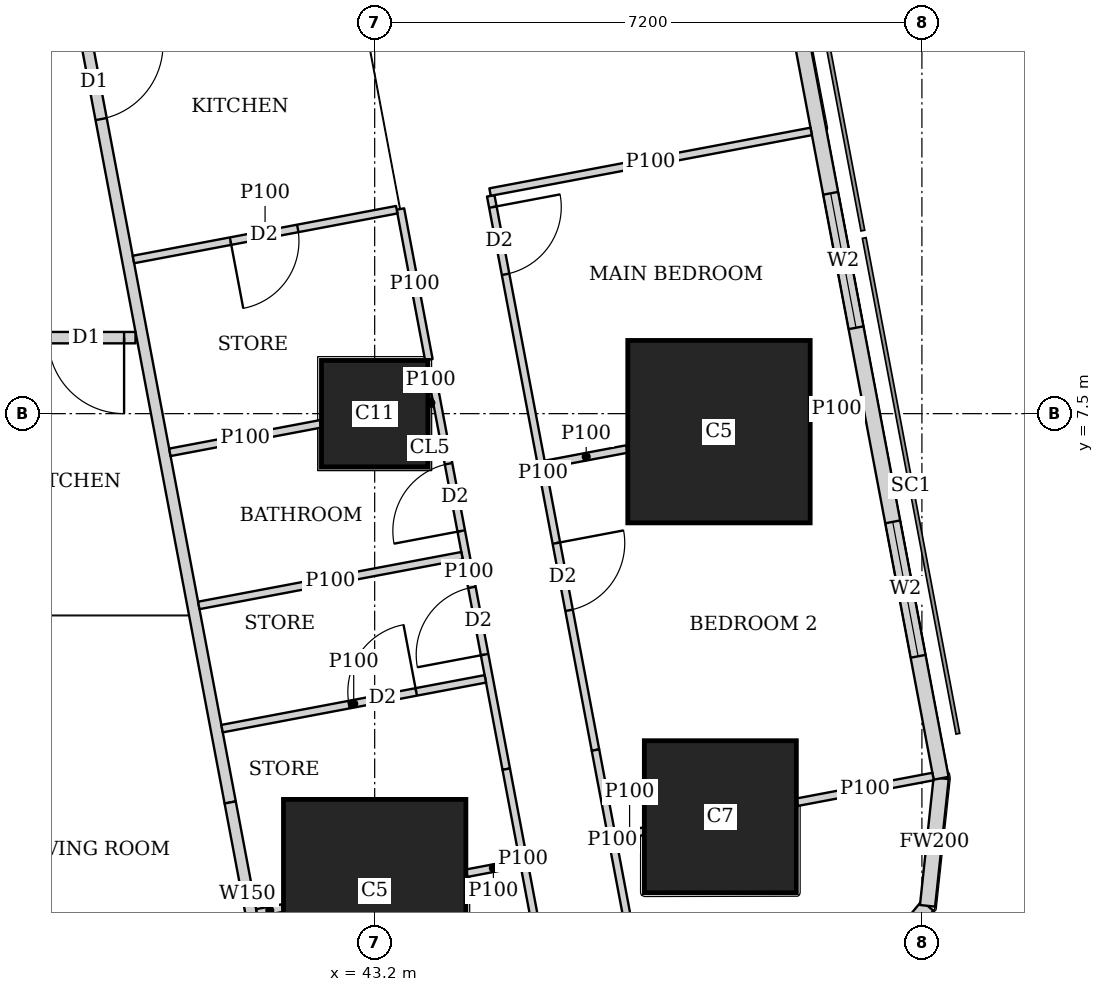
"""IFC4 building model, lengths in metres.
Left out: names, types, materials, properties, quantities, classifications, styles, units other than length and angle.
Written with IfcOpenShell. Run it as: python <this file> out.ifc"""

import sys

from ifc_helpers import new_model, si_unit, direction, frame, frame_2d, origin, origin_2d, place, context, subcontext, project, spatial, rectangle, extrude, element, fill, save


model = new_model("IFC4")
c1 = context("Model", 3, precision=1e-05, world=origin(), true_north=direction((0.0, 1.0)))
c2 = subcontext(c1, "Body", "Model", "MODEL_VIEW")
j1 = project(units=[si_unit("LENGTHUNIT", "METRE"), si_unit("PLANEANGLEUNIT", "RADIAN")], contexts=[c1])
p1 = place(None, origin())
s1 = spatial("IfcSite", under=j1, at=p1, CompositionType="ELEMENT")
p2 = place(p1, origin())
s2 = spatial("IfcBuilding", under=s1, at=p2, CompositionType="ELEMENT")
p3 = place(p2, frame((0.0, 0.0, 227.45)))
s3 = spatial("IfcBuildingStorey", under=s2, at=p3, CompositionType="ELEMENT", Elevation=227.45)
p4 = place(p3, frame((43.2, 1.225, 0.0), z_axis=(0.0, 0.0, 1.0), x_axis=(1.0, 0.0, 0.0)))
e1 = element("IfcColumn", 1, at=p4, inside=s3, PredefinedType="COLUMN", context=c2, shape_type="SweptSolid", body=[
    extrude(rectangle(XDim=2.4, YDim=2.4, at=origin_2d()), origin(), (0.0, 0.0, 1.0), 3.75),
])
p5 = place(p3, frame((47.748, 2.197, 0.0), z_axis=(0.0, 0.0, 1.0), x_axis=(1.0, 0.0, 0.0)))
e2 = element("IfcColumn", 2, at=p5, inside=s3, PredefinedType="COLUMN", context=c2, shape_type="SweptSolid", body=[
    extrude(rectangle(XDim=2.0, YDim=2.0, at=origin_2d()), origin(), (0.0, 0.0, 1.0), 3.75),
])
p6 = place(p3, frame((43.2, 7.5, 0.0), z_axis=(0.0, 0.0, 1.0), x_axis=(1.0, 0.0, 0.0)))
e3 = element("IfcColumn", 3, at=p6, inside=s3, PredefinedType="COLUMN", context=c2, shape_type="SweptSolid", body=[
    extrude(rectangle(XDim=1.4, YDim=1.4, at=origin_2d()), origin(), (0.0, 0.0, 1.0), 3.75),
])
p7 = place(p3, frame((47.73, 7.263, 0.0), z_axis=(0.0, 0.0, 1.0), x_axis=(1.0, 0.0, 0.0)))
e4 = element("IfcColumn", 4, at=p7, inside=s3, PredefinedType="COLUMN", context=c2, shape_type="SweptSolid", body=[
    extrude(rectangle(XDim=2.4, YDim=2.4, at=origin_2d()), origin(), (0.0, 0.0, 1.0), 3.75),
])
p8 = place(p3, frame((49.407, -0.263, 0.0), z_axis=(0.0, 0.0, 1.0), x_axis=(0.638042593423, 0.770001070764, 0.0)))
e5 = element("IfcWall", 5, at=p8, inside=s3, PredefinedType="SOLIDWALL", context=c2, shape_type="SweptSolid", body=[
    extrude(rectangle(XDim=1.673, YDim=0.2, at=frame_2d((0.836, 0.0))), origin(), (0.0, 0.0, 1.0), 3.5),
])
p9 = place(p3, frame((50.474, 1.025, 0.0), z_axis=(0.0, 0.0, 1.0), x_axis=(0.106047815515, 0.994361031429, 0.0)))
e6 = element("IfcWall", 6, at=p9, inside=s3, PredefinedType="SOLIDWALL", context=c2, shape_type="SweptSolid", body=[
    extrude(rectangle(XDim=1.688, YDim=0.2, at=frame_2d((0.844, 0.0))), origin(), (0.0, 0.0, 1.0), 3.5),
])
p10 = place(p3, frame((50.653, 2.703, 0.0), z_axis=(0.0, 0.0, 1.0), x_axis=(-0.185612026696, 0.982623109613, 0.0)))
e7 = element("IfcWall", 7, at=p10, inside=s3, PredefinedType="SOLIDWALL", context=c2, shape_type="SweptSolid", body=[
    extrude(rectangle(XDim=41.393, YDim=0.2, at=frame_2d((20.697, 0.0))), origin(), (0.0, 0.0, 1.0), 3.5),
])
p11 = place(p10, frame((1.633, 0.0, 0.9)))
e8 = element("IfcOpeningElement", 8, at=p11, cuts=e7, PredefinedType="OPENING", context=c2, shape_type="SweptSolid", body=[
    extrude(rectangle(XDim=1.8, YDim=1.5, at=frame_2d((0.9, 0.75))), frame((0.0, 0.11, 0.0), z_axis=(0.0, -1.0, 0.0), x_axis=(1.0, 0.0, 0.0)), (0.0, 0.0, 1.0), 0.22),
])
p12 = place(p10, frame((6.032, 0.0, 0.9)))
e9 = element("IfcOpeningElement", 9, at=p12, cuts=e7, PredefinedType="OPENING", context=c2, shape_type="SweptSolid", body=[
    extrude(rectangle(XDim=1.8, YDim=1.5, at=frame_2d((0.9, 0.75))), frame((0.0, 0.11, 0.0), z_axis=(0.0, -1.0, 0.0), x_axis=(1.0, 0.0, 0.0)), (0.0, 0.0, 1.0), 0.22),
])
p13 = place(p10, frame((9.848, 0.0, 0.9)))
e10 = element("IfcOpeningElement", 10, at=p13, cuts=e7, PredefinedType="OPENING", context=c2, shape_type="SweptSolid", body=[
    extrude(rectangle(XDim=1.8, YDim=1.5, at=frame_2d((0.9, 0.75))), frame((0.0, 0.11, 0.0), z_axis=(0.0, -1.0, 0.0), x_axis=(1.0, 0.0, 0.0)), (0.0, 0.0, 1.0), 0.22),
])
p14 = place(p10, frame((13.664, 0.0, 0.9)))
e11 = element("IfcOpeningElement", 11, at=p14, cuts=e7, PredefinedType="OPENING", context=c2, shape_type="SweptSolid", body=[
    extrude(rectangle(XDim=1.8, YDim=1.5, at=frame_2d((0.9, 0.75))), frame((0.0, 0.11, 0.0), z_axis=(0.0, -1.0, 0.0), x_axis=(1.0, 0.0, 0.0)), (0.0, 0.0, 1.0), 0.22),
])
p15 = place(p10, frame((17.481, 0.0, 0.9)))
e12 = element("IfcOpeningElement", 12, at=p15, cuts=e7, PredefinedType="OPENING", context=c2, shape_type="SweptSolid", body=[
    extrude(rectangle(XDim=1.8, YDim=1.5, at=frame_2d((0.9, 0.75))), frame((0.0, 0.11, 0.0), z_axis=(0.0, -1.0, 0.0), x_axis=(1.0, 0.0, 0.0)), (0.0, 0.0, 1.0), 0.22),
])
p16 = place(p10, frame((21.297, 0.0, 0.9)))
e13 = element("IfcOpeningElement", 13, at=p16, cuts=e7, PredefinedType="OPENING", context=c2, shape_type="SweptSolid", body=[
    extrude(rectangle(XDim=1.8, YDim=1.5, at=frame_2d((0.9, 0.75))), frame((0.0, 0.11, 0.0), z_axis=(0.0, -1.0, 0.0), x_axis=(1.0, 0.0, 0.0)), (0.0, 0.0, 1.0), 0.22),
])
p17 = place(p10, frame((25.113, 0.0, 0.9)))
e14 = element("IfcOpeningElement", 14, at=p17, cuts=e7, PredefinedType="OPENING", context=c2, shape_type="SweptSolid", body=[
    extrude(rectangle(XDim=1.8, YDim=1.5, at=frame_2d((0.9, 0.75))), frame((0.0, 0.11, 0.0), z_axis=(0.0, -1.0, 0.0), x_axis=(1.0, 0.0, 0.0)), (0.0, 0.0, 1.0), 0.22),
])
p18 = place(p10, frame((28.93, 0.0, 0.9)))
e15 = element("IfcOpeningElement", 15, at=p18, cuts=e7, PredefinedType="OPENING", context=c2, shape_type="SweptSolid", body=[
    extrude(rectangle(XDim=1.8, YDim=1.5, at=frame_2d((0.9, 0.75))), frame((0.0, 0.11, 0.0), z_axis=(0.0, -1.0, 0.0), x_axis=(1.0, 0.0, 0.0)), (0.0, 0.0, 1.0), 0.22),
])
p19 = place(p10, frame((32.746, 0.0, 0.9)))
e16 = element("IfcOpeningElement", 16, at=p19, cuts=e7, PredefinedType="OPENING", context=c2, shape_type="SweptSolid", body=[
    extrude(rectangle(XDim=1.8, YDim=1.5, at=frame_2d((0.9, 0.75))), frame((0.0, 0.11, 0.0), z_axis=(0.0, -1.0, 0.0), x_axis=(1.0, 0.0, 0.0)), (0.0, 0.0, 1.0), 0.22),
])
p20 = place(p10, frame((36.481, 0.0, 0.9)))
e17 = element("IfcOpeningElement", 17, at=p20, cuts=e7, PredefinedType="OPENING", context=c2, shape_type="SweptSolid", body=[
    extrude(rectangle(XDim=1.8, YDim=1.5, at=frame_2d((0.9, 0.75))), frame((0.0, 0.11, 0.0), z_axis=(0.0, -1.0, 0.0), x_axis=(1.0, 0.0, 0.0)), (0.0, 0.0, 1.0), 0.22),
])
p21 = place(p3, frame((40.053, 8.5, 0.0), z_axis=(0.0, 0.0, 1.0), x_axis=(-1.0, 0.0, 0.0)))
e18 = element("IfcWall", 18, at=p21, inside=s3, PredefinedType="SOLIDWALL", context=c2, shape_type="SweptSolid", body=[
    extrude(rectangle(XDim=23.798, YDim=0.15, at=frame_2d((11.899, 0.0))), origin(), (0.0, 0.0, 1.0), 3.5),
])
p22 = place(p21, frame((21.978, 0.0, 0.0)))
e19 = element("IfcOpeningElement", 19, at=p22, cuts=e18, PredefinedType="OPENING", context=c2, shape_type="SweptSolid", body=[
    extrude(rectangle(XDim=1.0, YDim=2.1, at=frame_2d((0.5, 1.05))), frame((0.0, 0.085, 0.0), z_axis=(0.0, -1.0, 0.0), x_axis=(1.0, 0.0, 0.0)), (0.0, 0.0, 1.0), 0.17),
])
p23 = place(p21, frame((12.753, 0.0, 0.0)))
e20 = element("IfcOpeningElement", 20, at=p23, cuts=e18, PredefinedType="OPENING", context=c2, shape_type="SweptSolid", body=[
    extrude(rectangle(XDim=1.0, YDim=2.1, at=frame_2d((0.5, 1.05))), frame((0.0, 0.085, 0.0), z_axis=(0.0, -1.0, 0.0), x_axis=(1.0, 0.0, 0.0)), (0.0, 0.0, 1.0), 0.17),
])
p24 = place(p21, frame((0.15, 0.0, 0.0)))
e21 = element("IfcOpeningElement", 21, at=p24, cuts=e18, PredefinedType="OPENING", context=c2, shape_type="SweptSolid", body=[
    extrude(rectangle(XDim=1.0, YDim=2.1, at=frame_2d((0.5, 1.05))), frame((0.0, 0.085, 0.0), z_axis=(0.0, -1.0, 0.0), x_axis=(1.0, 0.0, 0.0)), (0.0, 0.0, 1.0), 0.17),
])
p25 = place(p3, frame((33.68, 42.723, 0.0), z_axis=(0.0, 0.0, 1.0), x_axis=(0.185601160014, -0.982625162207, 0.0)))
e22 = element("IfcWall", 22, at=p25, inside=s3, PredefinedType="SOLIDWALL", context=c2, shape_type="SweptSolid", body=[
    extrude(rectangle(XDim=41.051, YDim=0.15, at=frame_2d((20.526, 0.0))), origin(), (0.0, 0.0, 1.0), 2.5),
])
p26 = place(p25, frame((16.123, 0.0, 0.0)))
e23 = element("IfcOpeningElement", 23, at=p26, cuts=e22, PredefinedType="OPENING", context=c2, shape_type="SweptSolid", body=[
    extrude(rectangle(XDim=1.0, YDim=2.1, at=frame_2d((0.5, 1.05))), frame((0.0, 0.085, 0.0), z_axis=(0.0, -1.0, 0.0), x_axis=(1.0, 0.0, 0.0)), (0.0, 0.0, 1.0), 0.17),
])
p27 = place(p25, frame((19.938, 0.0, 0.0)))
e24 = element("IfcOpeningElement", 24, at=p27, cuts=e22, PredefinedType="OPENING", context=c2, shape_type="SweptSolid", body=[
    extrude(rectangle(XDim=1.0, YDim=2.1, at=frame_2d((0.5, 1.05))), frame((0.0, 0.085, 0.0), z_axis=(0.0, -1.0, 0.0), x_axis=(1.0, 0.0, 0.0)), (0.0, 0.0, 1.0), 0.17),
])
p28 = place(p25, frame((30.902, 0.0, 0.0)))
e25 = element("IfcOpeningElement", 25, at=p28, cuts=e22, PredefinedType="OPENING", context=c2, shape_type="SweptSolid", body=[
    extrude(rectangle(XDim=1.0, YDim=2.1, at=frame_2d((0.5, 1.05))), frame((0.0, 0.085, 0.0), z_axis=(0.0, -1.0, 0.0), x_axis=(1.0, 0.0, 0.0)), (0.0, 0.0, 1.0), 0.17),
])
p29 = place(p3, frame((41.299, 2.385, 0.0), z_axis=(0.0, 0.0, 1.0), x_axis=(0.18529731833, -0.982682504077, 0.0)))
e26 = element("IfcWall", 26, at=p29, inside=s3, PredefinedType="SOLIDWALL", context=c2, shape_type="SweptSolid", body=[
    extrude(rectangle(XDim=2.455, YDim=0.15, at=frame_2d((1.227, 0.0))), origin(), (0.0, 0.0, 1.0), 2.05),
])
p30 = place(p3, frame((44.727, 10.366, 0.0), z_axis=(0.0, 0.0, 1.0), x_axis=(0.185678775129, -0.982610498858, 0.0)))
e27 = element("IfcWall", 27, at=p30, inside=s3, PredefinedType="PARTITIONING", context=c2, shape_type="SweptSolid", body=[
    extrude(rectangle(XDim=7.421, YDim=0.1, at=frame_2d((3.71, 0.0))), origin(), (0.0, 0.0, 1.0), 3.5),
])
p31 = place(p30, frame((0.151, 0.0, 0.0)))
e28 = element("IfcOpeningElement", 28, at=p31, cuts=e27, PredefinedType="OPENING", context=c2, shape_type="SweptSolid", body=[
    extrude(rectangle(XDim=0.9, YDim=2.1, at=frame_2d((0.45, 1.05))), frame((0.0, 0.06, 0.0), z_axis=(0.0, -1.0, 0.0), x_axis=(1.0, 0.0, 0.0)), (0.0, 0.0, 1.0), 0.12),
])
p32 = place(p30, frame((4.65, 0.0, 0.0)))
e29 = element("IfcOpeningElement", 29, at=p32, cuts=e27, PredefinedType="OPENING", context=c2, shape_type="SweptSolid", body=[
    extrude(rectangle(XDim=0.9, YDim=2.1, at=frame_2d((0.45, 1.05))), frame((0.0, 0.06, 0.0), z_axis=(0.0, -1.0, 0.0), x_axis=(1.0, 0.0, 0.0)), (0.0, 0.0, 1.0), 0.12),
])
p33 = place(p3, frame((46.105, 3.074, 0.0), z_axis=(0.0, 0.0, 1.0), x_axis=(0.185631845838, -0.982619365681, 0.0)))
e30 = element("IfcWall", 30, at=p33, inside=s3, PredefinedType="PARTITIONING", context=c2, shape_type="SweptSolid", body=[
    extrude(rectangle(XDim=2.403, YDim=0.1, at=frame_2d((1.201, 0.0))), origin(), (0.0, 0.0, 1.0), 2.05),
])
p34 = place(p3, frame((43.539, 10.192, 0.0), z_axis=(0.0, 0.0, 1.0), x_axis=(0.185443145218, -0.982654995353, 0.0)))
e31 = element("IfcWall", 31, at=p34, inside=s3, PredefinedType="PARTITIONING", context=c2, shape_type="SweptSolid", body=[
    extrude(rectangle(XDim=2.017, YDim=0.1, at=frame_2d((1.008, 0.0))), origin(), (0.0, 0.0, 1.0), 3.5),
])
p35 = place(p3, frame((43.949, 8.02, 0.0), z_axis=(0.0, 0.0, 1.0), x_axis=(0.185656792073, -0.982614652627, 0.0)))
e32 = element("IfcWall", 32, at=p35, inside=s3, PredefinedType="PARTITIONING", context=c2, shape_type="SweptSolid", body=[
    extrude(rectangle(XDim=5.289, YDim=0.1, at=frame_2d((2.645, 0.0))), origin(), (0.0, 0.0, 1.0), 3.5),
])
p36 = place(p35, frame((1.2, 0.0, 0.0)))
e33 = element("IfcOpeningElement", 33, at=p36, cuts=e32, PredefinedType="OPENING", context=c2, shape_type="SweptSolid", body=[
    extrude(rectangle(XDim=0.9, YDim=2.1, at=frame_2d((0.45, 1.05))), frame((0.0, 0.06, 0.0), z_axis=(0.0, -1.0, 0.0), x_axis=(1.0, 0.0, 0.0)), (0.0, 0.0, 1.0), 0.12),
])
p37 = place(p35, frame((2.855, 0.0, 0.0)))
e34 = element("IfcOpeningElement", 34, at=p37, cuts=e32, PredefinedType="OPENING", context=c2, shape_type="SweptSolid", body=[
    extrude(rectangle(XDim=0.9, YDim=2.1, at=frame_2d((0.45, 1.05))), frame((0.0, 0.06, 0.0), z_axis=(0.0, -1.0, 0.0), x_axis=(1.0, 0.0, 0.0)), (0.0, 0.0, 1.0), 0.12),
])
p38 = place(p3, frame((44.931, 2.823, 0.0), z_axis=(0.0, 0.0, 1.0), x_axis=(0.185631845838, -0.982619365681, 0.0)))
e35 = element("IfcWall", 35, at=p38, inside=s3, PredefinedType="PARTITIONING", context=c2, shape_type="SweptSolid", body=[
    extrude(rectangle(XDim=2.403, YDim=0.1, at=frame_2d((1.201, 0.0))), origin(), (0.0, 0.0, 1.0), 2.05),
])
p39 = place(p3, frame((48.943, 11.213, 0.0), z_axis=(0.0, 0.0, 1.0), x_axis=(-0.982633535512, -0.185556823879, 0.0)))
e36 = element("IfcWall", 36, at=p39, inside=s3, PredefinedType="PARTITIONING", context=c2, shape_type="SweptSolid", body=[
    extrude(rectangle(XDim=4.3, YDim=0.1, at=frame_2d((2.15, 0.0))), origin(), (0.0, 0.0, 1.0), 2.05),
])
p40 = place(p3, frame((49.622, 7.62, 0.0), z_axis=(0.0, 0.0, 1.0), x_axis=(-0.98254419619, -0.186029305578, 0.0)))
e37 = element("IfcWall", 37, at=p40, inside=s3, PredefinedType="PARTITIONING", context=c2, shape_type="SweptSolid", body=[
    extrude(rectangle(XDim=0.694, YDim=0.1, at=frame_2d((0.347, 0.0))), origin(), (0.0, 0.0, 1.0), 3.5),
])
p41 = place(p3, frame((46.52, 7.035, 0.0), z_axis=(0.0, 0.0, 1.0), x_axis=(-0.982620932907, -0.185623549726, 0.0)))
e38 = element("IfcWall", 38, at=p41, inside=s3, PredefinedType="PARTITIONING", context=c2, shape_type="SweptSolid", body=[
    extrude(rectangle(XDim=1.093, YDim=0.1, at=frame_2d((0.546, 0.0))), origin(), (0.0, 0.0, 1.0), 3.5),
])
p42 = place(p3, frame((50.547, 2.726, 0.0), z_axis=(0.0, 0.0, 1.0), x_axis=(-0.982603988143, -0.185713226471, 0.0)))
e39 = element("IfcWall", 39, at=p42, inside=s3, PredefinedType="PARTITIONING", context=c2, shape_type="SweptSolid", body=[
    extrude(rectangle(XDim=1.821, YDim=0.1, at=frame_2d((0.91, 0.0))), origin(), (0.0, 0.0, 1.0), 2.05),
])
p43 = place(p3, frame((46.738, 2.006, 0.0), z_axis=(0.0, 0.0, 1.0), x_axis=(-0.982820466874, -0.184564161994, 0.0)))
e40 = element("IfcWall", 40, at=p43, inside=s3, PredefinedType="PARTITIONING", context=c2, shape_type="SweptSolid", body=[
    extrude(rectangle(XDim=0.374, YDim=0.1, at=frame_2d((0.187, 0.0))), origin(), (0.0, 0.0, 1.0), 2.05),
])
p44 = place(p3, frame((43.49, 10.183, 0.0), z_axis=(0.0, 0.0, 1.0), x_axis=(-0.982588017646, -0.185797706064, 0.0)))
e41 = element("IfcWall", 41, at=p44, inside=s3, PredefinedType="PARTITIONING", context=c2, shape_type="SweptSolid", body=[
    extrude(rectangle(XDim=3.525, YDim=0.1, at=frame_2d((1.763, 0.0))), origin(), (0.0, 0.0, 1.0), 3.5),
])
p45 = place(p44, frame((1.325, 0.0, 0.0)))
e42 = element("IfcOpeningElement", 42, at=p45, cuts=e41, PredefinedType="OPENING", context=c2, shape_type="SweptSolid", body=[
    extrude(rectangle(XDim=0.9, YDim=2.1, at=frame_2d((0.45, 1.05))), frame((0.0, 0.06, 0.0), z_axis=(0.0, -1.0, 0.0), x_axis=(1.0, 0.0, 0.0)), (0.0, 0.0, 1.0), 0.12),
])
p46 = place(p3, frame((43.969, 7.646, 0.0), z_axis=(0.0, 0.0, 1.0), x_axis=(-0.983147034646, -0.182816597351, 0.0)))
e43 = element("IfcWall", 43, at=p46, inside=s3, PredefinedType="PARTITIONING", context=c2, shape_type="SweptSolid", body=[
    extrude(rectangle(XDim=0.06, YDim=0.1, at=frame_2d((0.03, 0.0))), origin(), (0.0, 0.0, 1.0), 3.5),
])
p47 = place(p3, frame((42.49, 7.366, 0.0), z_axis=(0.0, 0.0, 1.0), x_axis=(-0.982620917875, -0.185623629302, 0.0)))
e44 = element("IfcWall", 44, at=p47, inside=s3, PredefinedType="PARTITIONING", context=c2, shape_type="SweptSolid", body=[
    extrude(rectangle(XDim=2.02, YDim=0.1, at=frame_2d((1.01, 0.0))), origin(), (0.0, 0.0, 1.0), 3.5),
])
p48 = place(p3, frame((45.114, 1.587, 0.0), z_axis=(0.0, 0.0, 1.0), x_axis=(-0.982671022916, -0.185358195723, 0.0)))
e45 = element("IfcWall", 45, at=p48, inside=s3, PredefinedType="PARTITIONING", context=c2, shape_type="SweptSolid", body=[
    extrude(rectangle(XDim=0.717, YDim=0.1, at=frame_2d((0.358, 0.0))), origin(), (0.0, 0.0, 1.0), 2.05),
])
p49 = place(p3, frame((41.99, 0.996, 0.0), z_axis=(0.0, 0.0, 1.0), x_axis=(-0.982639822555, -0.185523527159, 0.0)))
e46 = element("IfcWall", 46, at=p49, inside=s3, PredefinedType="PARTITIONING", context=c2, shape_type="SweptSolid", body=[
    extrude(rectangle(XDim=0.346, YDim=0.1, at=frame_2d((0.173, 0.0))), origin(), (0.0, 0.0, 1.0), 2.05),
])
p50 = place(p3, frame((44.35, 5.631, 0.0), z_axis=(0.0, 0.0, 1.0), x_axis=(-0.982638553676, -0.185530247748, 0.0)))
e47 = element("IfcWall", 47, at=p50, inside=s3, PredefinedType="PARTITIONING", context=c2, shape_type="SweptSolid", body=[
    extrude(rectangle(XDim=3.525, YDim=0.1, at=frame_2d((1.763, 0.0))), origin(), (0.0, 0.0, 1.0), 3.5),
])
p51 = place(p3, frame((41.192, 3.356, 0.0), z_axis=(0.0, 0.0, 1.0), x_axis=(0.982588017646, 0.185797706064, 0.0)))
e48 = element("IfcWall", 48, at=p51, inside=s3, PredefinedType="PARTITIONING", context=c2, shape_type="SweptSolid", body=[
    extrude(rectangle(XDim=3.525, YDim=0.1, at=frame_2d((1.763, 0.0))), origin(), (0.0, 0.0, 1.0), 3.5),
])
p52 = place(p51, frame((1.7, 0.0, 0.0)))
e49 = element("IfcOpeningElement", 49, at=p52, cuts=e48, PredefinedType="OPENING", context=c2, shape_type="SweptSolid", body=[
    extrude(rectangle(XDim=0.9, YDim=2.1, at=frame_2d((0.45, 1.05))), frame((0.0, 0.06, 0.0), z_axis=(0.0, -1.0, 0.0), x_axis=(1.0, 0.0, 0.0)), (0.0, 0.0, 1.0), 0.12),
])
p53 = place(p11, origin())
e50 = element("IfcWindow", 50, at=p53, inside=s3, PartitioningType="SINGLE_PANEL", PredefinedType="WINDOW", context=c2, shape_type="SweptSolid", body=[
    extrude(rectangle(XDim=1.8, YDim=1.5, at=frame_2d((0.9, 0.75))), frame((0.0, 0.03, 0.0), z_axis=(0.0, -1.0, 0.0), x_axis=(1.0, 0.0, 0.0)), (0.0, 0.0, 1.0), 0.06),
])
fill(e8, e50)
p54 = place(p12, origin())
e51 = element("IfcWindow", 51, at=p54, inside=s3, PartitioningType="SINGLE_PANEL", PredefinedType="WINDOW", context=c2, shape_type="SweptSolid", body=[
    extrude(rectangle(XDim=1.8, YDim=1.5, at=frame_2d((0.9, 0.75))), frame((0.0, 0.03, 0.0), z_axis=(0.0, -1.0, 0.0), x_axis=(1.0, 0.0, 0.0)), (0.0, 0.0, 1.0), 0.06),
])
fill(e9, e51)
p55 = place(p24, origin())
e52 = element("IfcDoor", 52, at=p55, inside=s3, OperationType="SINGLE_SWING_LEFT", PredefinedType="DOOR", context=c2, shape_type="SweptSolid", body=[
    extrude(rectangle(XDim=1.0, YDim=2.1, at=frame_2d((0.5, 1.05))), frame((0.0, 0.025, 0.0), z_axis=(0.0, -1.0, 0.0), x_axis=(1.0, 0.0, 0.0)), (0.0, 0.0, 1.0), 0.05),
])
fill(e21, e52)
p56 = place(p31, origin())
e53 = element("IfcDoor", 53, at=p56, inside=s3, OperationType="SINGLE_SWING_LEFT", PredefinedType="DOOR", context=c2, shape_type="SweptSolid", body=[
    extrude(rectangle(XDim=0.9, YDim=2.1, at=frame_2d((0.45, 1.05))), frame((0.0, 0.025, 0.0), z_axis=(0.0, -1.0, 0.0), x_axis=(1.0, 0.0, 0.0)), (0.0, 0.0, 1.0), 0.05),
])
fill(e28, e53)
p57 = place(p32, origin())
e54 = element("IfcDoor", 54, at=p57, inside=s3, OperationType="SINGLE_SWING_LEFT", PredefinedType="DOOR", context=c2, shape_type="SweptSolid", body=[
    extrude(rectangle(XDim=0.9, YDim=2.1, at=frame_2d((0.45, 1.05))), frame((0.0, 0.025, 0.0), z_axis=(0.0, -1.0, 0.0), x_axis=(1.0, 0.0, 0.0)), (0.0, 0.0, 1.0), 0.05),
])
fill(e29, e54)
p58 = place(p36, origin())
e55 = element("IfcDoor", 55, at=p58, inside=s3, OperationType="SINGLE_SWING_LEFT", PredefinedType="DOOR", context=c2, shape_type="SweptSolid", body=[
    extrude(rectangle(XDim=0.9, YDim=2.1, at=frame_2d((0.45, 1.05))), frame((0.0, 0.025, 0.0), z_axis=(0.0, -1.0, 0.0), x_axis=(1.0, 0.0, 0.0)), (0.0, 0.0, 1.0), 0.05),
])
fill(e33, e55)
p59 = place(p37, origin())
e56 = element("IfcDoor", 56, at=p59, inside=s3, OperationType="SINGLE_SWING_LEFT", PredefinedType="DOOR", context=c2, shape_type="SweptSolid", body=[
    extrude(rectangle(XDim=0.9, YDim=2.1, at=frame_2d((0.45, 1.05))), frame((0.0, 0.025, 0.0), z_axis=(0.0, -1.0, 0.0), x_axis=(1.0, 0.0, 0.0)), (0.0, 0.0, 1.0), 0.05),
])
fill(e34, e56)
p60 = place(p28, origin())
e57 = element("IfcDoor", 57, at=p60, inside=s3, OperationType="SINGLE_SWING_LEFT", PredefinedType="DOOR", context=c2, shape_type="SweptSolid", body=[
    extrude(rectangle(XDim=1.0, YDim=2.1, at=frame_2d((0.5, 1.05))), frame((0.0, 0.025, 0.0), z_axis=(0.0, -1.0, 0.0), x_axis=(1.0, 0.0, 0.0)), (0.0, 0.0, 1.0), 0.05),
])
fill(e25, e57)
p61 = place(p45, origin())
e58 = element("IfcDoor", 58, at=p61, inside=s3, OperationType="SINGLE_SWING_RIGHT", PredefinedType="DOOR", context=c2, shape_type="SweptSolid", body=[
    extrude(rectangle(XDim=0.9, YDim=2.1, at=frame_2d((0.45, 1.05))), frame((0.0, 0.025, 0.0), z_axis=(0.0, -1.0, 0.0), x_axis=(1.0, 0.0, 0.0)), (0.0, 0.0, 1.0), 0.05),
])
fill(e42, e58)
p62 = place(p52, origin())
e59 = element("IfcDoor", 59, at=p62, inside=s3, OperationType="SINGLE_SWING_RIGHT", PredefinedType="DOOR", context=c2, shape_type="SweptSolid", body=[
    extrude(rectangle(XDim=0.9, YDim=2.1, at=frame_2d((0.45, 1.05))), frame((0.0, 0.025, 0.0), z_axis=(0.0, -1.0, 0.0), x_axis=(1.0, 0.0, 0.0)), (0.0, 0.0, 1.0), 0.05),
])
fill(e49, e59)
save(model, sys.argv[1])
